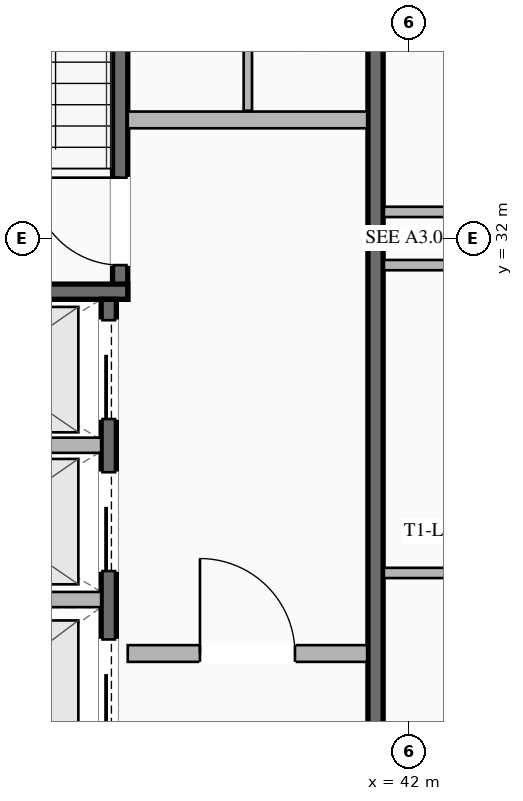
"""IFC4 building model, lengths in metres.
Left out: names, types, materials, properties, quantities, classifications, styles, units other than length and angle.
Written with IfcOpenShell. Run it as: python <this file> out.ifc"""

import sys

from ifc_helpers import new_model, si_unit, direction, frame, frame_2d, origin, place, context, subcontext, project, spatial, rectangle, extrude, element, fill, save


model = new_model("IFC4")
c1 = context("Model", 3, precision=1e-05, world=origin(), true_north=direction((0.0, 1.0)))
c2 = subcontext(c1, "Body", "Model", "MODEL_VIEW")
j1 = project(units=[si_unit("LENGTHUNIT", "METRE"), si_unit("PLANEANGLEUNIT", "RADIAN")], contexts=[c1])
p1 = place(None, origin())
s1 = spatial("IfcSite", under=j1, at=p1, CompositionType="ELEMENT")
p2 = place(p1, origin())
s2 = spatial("IfcBuilding", under=s1, at=p2, CompositionType="ELEMENT")
p3 = place(p2, frame((0.0, 0.0, 270.5)))
s3 = spatial("IfcBuildingStorey", under=s2, at=p3, CompositionType="ELEMENT", Elevation=270.5)
p4 = place(p3, frame((38.2, 31.2, 0.0), z_axis=(0.0, 0.0, 1.0), x_axis=(0.0, 1.0, 0.0)))
e1 = element("IfcWall", 1, at=p4, inside=s3, PredefinedType="SHEAR", context=c2, shape_type="SweptSolid", body=[
    extrude(rectangle(XDim=8.15, YDim=0.2, at=frame_2d((4.075, 0.0))), origin(), (0.0, 0.0, 1.0), 3.37),
])
p5 = place(p4, frame((0.45, 0.0, 0.0)))
e2 = element("IfcOpeningElement", 2, at=p5, cuts=e1, PredefinedType="OPENING", context=c2, shape_type="SweptSolid", body=[
    extrude(rectangle(XDim=1.15, YDim=2.2, at=frame_2d((0.575, 1.1))), frame((0.0, 0.11, 0.0), z_axis=(0.0, -1.0, 0.0), x_axis=(1.0, 0.0, 0.0)), (0.0, 0.0, 1.0), 0.22),
])
p6 = place(p3, frame((34.65, 31.3, 0.0), z_axis=(0.0, 0.0, 1.0), x_axis=(1.0, 0.0, 0.0)))
e3 = element("IfcWall", 3, at=p6, inside=s3, PredefinedType="SHEAR", context=c2, shape_type="SweptSolid", body=[
    extrude(rectangle(XDim=3.65, YDim=0.2, at=frame_2d((1.825, 0.0))), origin(), (0.0, 0.0, 1.0), 3.37),
])
p7 = place(p3, frame((41.56, 24.65, 0.0), z_axis=(0.0, 0.0, 1.0), x_axis=(0.0, 1.0, 0.0)))
e4 = element("IfcWall", 4, at=p7, inside=s3, PredefinedType="SHEAR", context=c2, shape_type="SweptSolid", body=[
    extrude(rectangle(XDim=14.7, YDim=0.2, at=frame_2d((7.35, 0.0))), origin(), (0.0, 0.0, 1.0), 3.37),
])
p8 = place(p3, frame((38.3, 33.56, 0.0), z_axis=(0.0, 0.0, 1.0), x_axis=(1.0, 0.0, 0.0)))
e5 = element("IfcWall", 5, at=p8, inside=s3, PredefinedType="SOLIDWALL", context=c2, shape_type="SweptSolid", body=[
    extrude(rectangle(XDim=3.15, YDim=0.22, at=frame_2d((1.575, 0.0))), origin(), (0.0, 0.0, 1.0), 2.723),
])
p9 = place(p3, frame((38.3, 26.54, 0.0), z_axis=(0.0, 0.0, 1.0), x_axis=(1.0, 0.0, 0.0)))
e6 = element("IfcWall", 6, at=p9, inside=s3, PredefinedType="SOLIDWALL", context=c2, shape_type="SweptSolid", body=[
    extrude(rectangle(XDim=3.15, YDim=0.22, at=frame_2d((1.575, 0.0))), origin(), (0.0, 0.0, 1.0), 2.723),
])
p10 = place(p9, frame((0.95, 0.0, 0.0)))
e7 = element("IfcOpeningElement", 7, at=p10, cuts=e6, PredefinedType="OPENING", context=c2, shape_type="SweptSolid", body=[
    extrude(rectangle(XDim=1.25, YDim=2.25, at=frame_2d((0.625, 1.125))), frame((0.0, 0.12, 0.0), z_axis=(0.0, -1.0, 0.0), x_axis=(1.0, 0.0, 0.0)), (0.0, 0.0, 1.0), 0.24),
])
p11 = place(p3, frame((38.05, 24.65, 0.0), z_axis=(0.0, 0.0, 1.0), x_axis=(0.0, 1.0, 0.0)))
e8 = element("IfcWall", 8, at=p11, inside=s3, PredefinedType="SHEAR", context=c2, shape_type="SweptSolid", body=[
    extrude(rectangle(XDim=6.55, YDim=0.2, at=frame_2d((3.275, 0.0))), origin(), (0.0, 0.0, 1.0), 3.37),
])
p12 = place(p11, frame((4.975, 0.0, 0.0)))
e9 = element("IfcOpeningElement", 9, at=p12, cuts=e8, PredefinedType="OPENING", context=c2, shape_type="SweptSolid", body=[
    extrude(rectangle(XDim=1.3, YDim=2.25, at=frame_2d((0.65, 1.125))), frame((0.0, 0.11, 0.0), z_axis=(0.0, -1.0, 0.0), x_axis=(1.0, 0.0, 0.0)), (0.0, 0.0, 1.0), 0.22),
])
p13 = place(p11, frame((2.975, 0.0, 0.0)))
e10 = element("IfcOpeningElement", 10, at=p13, cuts=e8, PredefinedType="OPENING", context=c2, shape_type="SweptSolid", body=[
    extrude(rectangle(XDim=1.3, YDim=2.25, at=frame_2d((0.65, 1.125))), frame((0.0, 0.11, 0.0), z_axis=(0.0, -1.0, 0.0), x_axis=(1.0, 0.0, 0.0)), (0.0, 0.0, 1.0), 0.22),
])
p14 = place(p11, frame((0.775, 0.0, 0.0)))
e11 = element("IfcOpeningElement", 11, at=p14, cuts=e8, PredefinedType="OPENING", context=c2, shape_type="SweptSolid", body=[
    extrude(rectangle(XDim=1.3, YDim=2.25, at=frame_2d((0.65, 1.125))), frame((0.0, 0.11, 0.0), z_axis=(0.0, -1.0, 0.0), x_axis=(1.0, 0.0, 0.0)), (0.0, 0.0, 1.0), 0.22),
])
for number, where, z_axis, x_axis in (
    (12, (34.65, 27.25, 0.0), (0.0, 0.0, 1.0), (1.0, 0.0, 0.0)),
    (13, (34.65, 29.28, 0.0), (0.0, 0.0, 1.0), (1.0, 0.0, 0.0)),
):
    element("IfcWall", number, at=place(p3, frame(where, z_axis=z_axis, x_axis=x_axis)), inside=s3, PredefinedType="SOLIDWALL", context=c2, shape_type="SweptSolid", body=[
        extrude(rectangle(XDim=3.3, YDim=0.2, at=frame_2d((1.65, 0.0))), origin(), (0.0, 0.0, 1.0), 3.37),
    ])
p15 = place(p3, frame((39.88, 33.68, 0.0), z_axis=(0.0, 0.0, 1.0), x_axis=(0.0, 1.0, 0.0)))
e14 = element("IfcWall", 14, at=p15, inside=s3, PredefinedType="PARTITIONING", context=c2, shape_type="SweptSolid", body=[
    extrude(rectangle(XDim=3.8, YDim=0.11, at=frame_2d((1.9, 0.0))), origin(), (0.0, 0.0, 1.0), 2.723),
])
for number, where, z_axis, x_axis in (
    (15, (41.67, 31.65, 0.0), (0.0, 0.0, 1.0), (1.0, 0.0, 0.0)),
    (16, (41.67, 27.6, 0.0), (0.0, 0.0, 1.0), (1.0, 0.0, 0.0)),
    (17, (41.67, 32.35, 0.0), (0.0, 0.0, 1.0), (1.0, 0.0, 0.0)),
):
    element("IfcWall", number, at=place(p3, frame(where, z_axis=z_axis, x_axis=x_axis)), inside=s3, PredefinedType="PARTITIONING", context=c2, shape_type="SweptSolid", body=[
        extrude(rectangle(XDim=1.88, YDim=0.135, at=frame_2d((0.94, 0.0))), origin(), (0.0, 0.0, 1.0), 2.723),
    ])
p16 = place(p5, origin())
e18 = element("IfcDoor", 18, at=p16, inside=s3, OperationType="SINGLE_SWING_RIGHT", PredefinedType="DOOR", context=c2, shape_type="SweptSolid", body=[
    extrude(rectangle(XDim=1.15, YDim=2.2, at=frame_2d((0.575, 1.1))), frame((0.0, 0.025, 0.0), z_axis=(0.0, -1.0, 0.0), x_axis=(1.0, 0.0, 0.0)), (0.0, 0.0, 1.0), 0.05),
])
fill(e2, e18)
p17 = place(p10, origin())
e19 = element("IfcDoor", 19, at=p17, inside=s3, OperationType="SINGLE_SWING_LEFT", PredefinedType="DOOR", context=c2, shape_type="SweptSolid", body=[
    extrude(rectangle(XDim=1.25, YDim=2.25, at=frame_2d((0.625, 1.125))), frame((0.0, 0.025, 0.0), z_axis=(0.0, -1.0, 0.0), x_axis=(1.0, 0.0, 0.0)), (0.0, 0.0, 1.0), 0.05),
])
fill(e7, e19)
p18 = place(p12, origin())
e20 = element("IfcDoor", 20, at=p18, inside=s3, OperationType="SLIDING_TO_LEFT", PredefinedType="DOOR", context=c2, shape_type="SweptSolid", body=[
    extrude(rectangle(XDim=1.3, YDim=2.25, at=frame_2d((0.65, 1.125))), frame((0.0, 0.025, 0.0), z_axis=(0.0, -1.0, 0.0), x_axis=(1.0, 0.0, 0.0)), (0.0, 0.0, 1.0), 0.05),
])
fill(e9, e20)
p19 = place(p13, origin())
e21 = element("IfcDoor", 21, at=p19, inside=s3, OperationType="SLIDING_TO_LEFT", PredefinedType="DOOR", context=c2, shape_type="SweptSolid", body=[
    extrude(rectangle(XDim=1.3, YDim=2.25, at=frame_2d((0.65, 1.125))), frame((0.0, 0.025, 0.0), z_axis=(0.0, -1.0, 0.0), x_axis=(1.0, 0.0, 0.0)), (0.0, 0.0, 1.0), 0.05),
])
fill(e10, e21)
p20 = place(p14, origin())
e22 = element("IfcDoor", 22, at=p20, inside=s3, OperationType="SLIDING_TO_LEFT", PredefinedType="DOOR", context=c2, shape_type="SweptSolid", body=[
    extrude(rectangle(XDim=1.3, YDim=2.25, at=frame_2d((0.65, 1.125))), frame((0.0, 0.025, 0.0), z_axis=(0.0, -1.0, 0.0), x_axis=(1.0, 0.0, 0.0)), (0.0, 0.0, 1.0), 0.05),
])
fill(e11, e22)
save(model, sys.argv[1])
